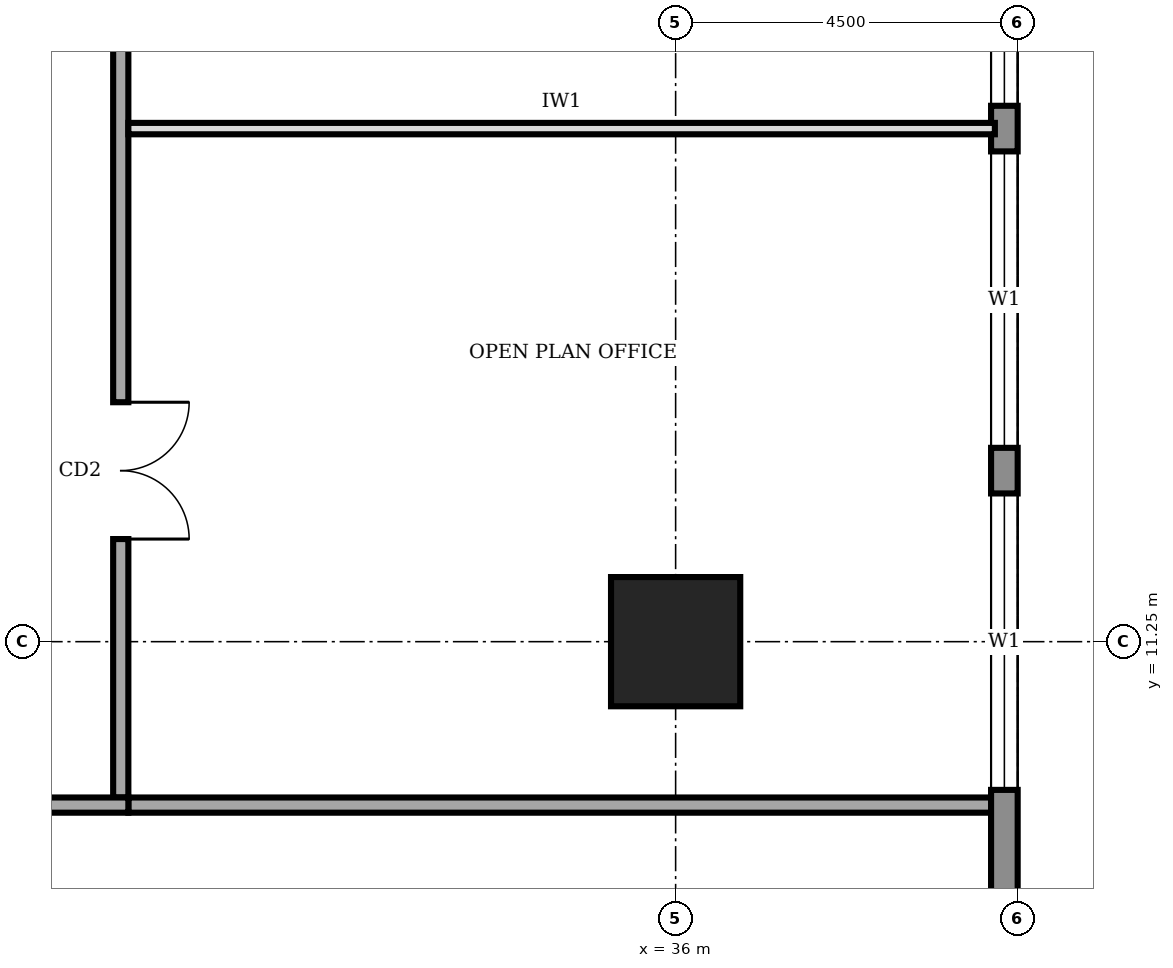
"""IFC4 building model, lengths in metres.
Left out: names, types, materials, properties, quantities, classifications, styles, units other than length and angle.
Written with IfcOpenShell. Run it as: python <this file> out.ifc"""

import sys

from ifc_helpers import new_model, si_unit, direction, frame, frame_2d, origin, origin_2d, place, context, subcontext, project, spatial, rectangle, extrude, element, fill, save


model = new_model("IFC4")
c1 = context("Model", 3, precision=1e-05, world=origin(), true_north=direction((0.0, 1.0)))
c2 = subcontext(c1, "Body", "Model", "MODEL_VIEW")
j1 = project(units=[si_unit("LENGTHUNIT", "METRE"), si_unit("PLANEANGLEUNIT", "RADIAN")], contexts=[c1])
p1 = place(None, origin())
s1 = spatial("IfcSite", under=j1, at=p1, CompositionType="ELEMENT")
p2 = place(p1, origin())
s2 = spatial("IfcBuilding", under=s1, at=p2, CompositionType="ELEMENT")
p3 = place(p2, frame((0.0, 0.0, 273.0)))
s3 = spatial("IfcBuildingStorey", under=s2, at=p3, CompositionType="ELEMENT", Elevation=273.0)
p4 = place(p3, frame((36.0, 11.25, 0.0), z_axis=(0.0, 0.0, 1.0), x_axis=(1.0, 0.0, 0.0)))
e1 = element("IfcColumn", 1, at=p4, inside=s3, PredefinedType="COLUMN", context=c2, shape_type="SweptSolid", body=[
    extrude(rectangle(XDim=1.7, YDim=1.7, at=origin_2d()), origin(), (0.0, 0.0, 1.0), 4.0),
])
p5 = place(p3, frame((40.325, 4.52, 0.0), z_axis=(0.0, 0.0, 1.0), x_axis=(0.0, 1.0, 0.0)))
e2 = element("IfcWall", 2, at=p5, inside=s3, PredefinedType="STANDARD", context=c2, shape_type="SweptSolid", body=[
    extrude(rectangle(XDim=31.46, YDim=0.35, at=frame_2d((15.73, 0.0))), origin(), (0.0, 0.0, 1.0), 3.75),
])
p6 = place(p5, frame((4.78, 0.0, 0.9)))
e3 = element("IfcOpeningElement", 3, at=p6, cuts=e2, PredefinedType="OPENING", context=c2, shape_type="SweptSolid", body=[
    extrude(rectangle(XDim=3.9, YDim=2.2, at=frame_2d((1.95, 1.1))), frame((0.0, 0.185, 0.0), z_axis=(0.0, -1.0, 0.0), x_axis=(1.0, 0.0, 0.0)), (0.0, 0.0, 1.0), 0.37),
])
p7 = place(p5, frame((9.28, 0.0, 0.9)))
e4 = element("IfcOpeningElement", 4, at=p7, cuts=e2, PredefinedType="OPENING", context=c2, shape_type="SweptSolid", body=[
    extrude(rectangle(XDim=3.9, YDim=2.2, at=frame_2d((1.95, 1.1))), frame((0.0, 0.185, 0.0), z_axis=(0.0, -1.0, 0.0), x_axis=(1.0, 0.0, 0.0)), (0.0, 0.0, 1.0), 0.37),
])
p8 = place(p5, frame((13.78, 0.0, 0.9)))
e5 = element("IfcOpeningElement", 5, at=p8, cuts=e2, PredefinedType="OPENING", context=c2, shape_type="SweptSolid", body=[
    extrude(rectangle(XDim=3.9, YDim=2.2, at=frame_2d((1.95, 1.1))), frame((0.0, 0.185, 0.0), z_axis=(0.0, -1.0, 0.0), x_axis=(1.0, 0.0, 0.0)), (0.0, 0.0, 1.0), 0.37),
])
p9 = place(p5, frame((18.28, 0.0, 0.9)))
e6 = element("IfcOpeningElement", 6, at=p9, cuts=e2, PredefinedType="OPENING", context=c2, shape_type="SweptSolid", body=[
    extrude(rectangle(XDim=3.9, YDim=2.2, at=frame_2d((1.95, 1.1))), frame((0.0, 0.185, 0.0), z_axis=(0.0, -1.0, 0.0), x_axis=(1.0, 0.0, 0.0)), (0.0, 0.0, 1.0), 0.37),
])
p10 = place(p5, frame((22.78, 0.0, 0.9)))
e7 = element("IfcOpeningElement", 7, at=p10, cuts=e2, PredefinedType="OPENING", context=c2, shape_type="SweptSolid", body=[
    extrude(rectangle(XDim=3.9, YDim=2.2, at=frame_2d((1.95, 1.1))), frame((0.0, 0.185, 0.0), z_axis=(0.0, -1.0, 0.0), x_axis=(1.0, 0.0, 0.0)), (0.0, 0.0, 1.0), 0.37),
])
p11 = place(p5, frame((27.21, 0.0, 0.9)))
e8 = element("IfcOpeningElement", 8, at=p11, cuts=e2, PredefinedType="OPENING", context=c2, shape_type="SweptSolid", body=[
    extrude(rectangle(XDim=3.9, YDim=2.2, at=frame_2d((1.95, 1.1))), frame((0.0, 0.185, 0.0), z_axis=(0.0, -1.0, 0.0), x_axis=(1.0, 0.0, 0.0)), (0.0, 0.0, 1.0), 0.37),
])
p12 = place(p3, frame((11.9, 9.1, 0.0), z_axis=(0.0, 0.0, 1.0), x_axis=(1.0, 0.0, 0.0)))
e9 = element("IfcWall", 9, at=p12, inside=s3, PredefinedType="SOLIDWALL", context=c2, shape_type="SweptSolid", body=[
    extrude(rectangle(XDim=16.9, YDim=0.2, at=frame_2d((8.45, 0.0))), origin(), (0.0, 0.0, 1.0), 3.75),
])
p13 = place(p12, frame((0.275, 0.0, 0.0)))
e10 = element("IfcOpeningElement", 10, at=p13, cuts=e9, PredefinedType="OPENING", context=c2, shape_type="SweptSolid", body=[
    extrude(rectangle(XDim=1.0, YDim=2.1, at=frame_2d((0.5, 1.05))), frame((0.0, 0.11, 0.0), z_axis=(0.0, -1.0, 0.0), x_axis=(1.0, 0.0, 0.0)), (0.0, 0.0, 1.0), 0.22),
])
p14 = place(p12, frame((8.35, 0.0, 0.0)))
e11 = element("IfcOpeningElement", 11, at=p14, cuts=e9, PredefinedType="OPENING", context=c2, shape_type="SweptSolid", body=[
    extrude(rectangle(XDim=1.8, YDim=2.1, at=frame_2d((0.9, 1.05))), frame((0.0, 0.11, 0.0), z_axis=(0.0, -1.0, 0.0), x_axis=(1.0, 0.0, 0.0)), (0.0, 0.0, 1.0), 0.22),
])
p15 = place(p3, frame((28.7, 9.2, 0.0), z_axis=(0.0, 0.0, 1.0), x_axis=(0.0, 1.0, 0.0)))
e12 = element("IfcWall", 12, at=p15, inside=s3, PredefinedType="SOLIDWALL", context=c2, shape_type="SweptSolid", body=[
    extrude(rectangle(XDim=23.8, YDim=0.2, at=frame_2d((11.9, 0.0))), origin(), (0.0, 0.0, 1.0), 3.75),
])
p16 = place(p15, frame((3.4, 0.0, 0.0)))
e13 = element("IfcOpeningElement", 13, at=p16, cuts=e12, PredefinedType="OPENING", context=c2, shape_type="SweptSolid", body=[
    extrude(rectangle(XDim=1.8, YDim=2.1, at=frame_2d((0.9, 1.05))), frame((0.0, 0.11, 0.0), z_axis=(0.0, -1.0, 0.0), x_axis=(1.0, 0.0, 0.0)), (0.0, 0.0, 1.0), 0.22),
])
p17 = place(p15, frame((10.55, 0.0, 0.0)))
e14 = element("IfcOpeningElement", 14, at=p17, cuts=e12, PredefinedType="OPENING", context=c2, shape_type="SweptSolid", body=[
    extrude(rectangle(XDim=1.0, YDim=2.1, at=frame_2d((0.5, 1.05))), frame((0.0, 0.11, 0.0), z_axis=(0.0, -1.0, 0.0), x_axis=(1.0, 0.0, 0.0)), (0.0, 0.0, 1.0), 0.22),
])
p18 = place(p15, frame((17.65, 0.0, 0.0)))
e15 = element("IfcOpeningElement", 15, at=p18, cuts=e12, PredefinedType="OPENING", context=c2, shape_type="SweptSolid", body=[
    extrude(rectangle(XDim=1.8, YDim=2.1, at=frame_2d((0.9, 1.05))), frame((0.0, 0.11, 0.0), z_axis=(0.0, -1.0, 0.0), x_axis=(1.0, 0.0, 0.0)), (0.0, 0.0, 1.0), 0.22),
])
p19 = place(p3, frame((28.8, 9.1, 0.0), z_axis=(0.0, 0.0, 1.0), x_axis=(1.0, 0.0, 0.0)))
e16 = element("IfcWall", 16, at=p19, inside=s3, PredefinedType="SOLIDWALL", context=c2, shape_type="SweptSolid", body=[
    extrude(rectangle(XDim=11.4, YDim=0.2, at=frame_2d((5.7, 0.0))), origin(), (0.0, 0.0, 1.0), 3.75),
])
p20 = place(p3, frame((28.8, 18.0, 0.0), z_axis=(0.0, 0.0, 1.0), x_axis=(1.0, 0.0, 0.0)))
e17 = element("IfcWall", 17, at=p20, inside=s3, PredefinedType="PARTITIONING", context=c2, shape_type="SweptSolid", body=[
    extrude(rectangle(XDim=11.4, YDim=0.15, at=frame_2d((5.7, 0.0))), origin(), (0.0, 0.0, 1.0), 3.75),
])
p21 = place(p6, origin())
e18 = element("IfcWindow", 18, at=p21, inside=s3, PartitioningType="SINGLE_PANEL", PredefinedType="WINDOW", context=c2, shape_type="SweptSolid", body=[
    extrude(rectangle(XDim=3.9, YDim=2.2, at=frame_2d((1.95, 1.1))), frame((0.0, 0.03, 0.0), z_axis=(0.0, -1.0, 0.0), x_axis=(1.0, 0.0, 0.0)), (0.0, 0.0, 1.0), 0.06),
])
fill(e3, e18)
p22 = place(p7, origin())
e19 = element("IfcWindow", 19, at=p22, inside=s3, PartitioningType="SINGLE_PANEL", PredefinedType="WINDOW", context=c2, shape_type="SweptSolid", body=[
    extrude(rectangle(XDim=3.9, YDim=2.2, at=frame_2d((1.95, 1.1))), frame((0.0, 0.03, 0.0), z_axis=(0.0, -1.0, 0.0), x_axis=(1.0, 0.0, 0.0)), (0.0, 0.0, 1.0), 0.06),
])
fill(e4, e19)
p23 = place(p8, origin())
e20 = element("IfcWindow", 20, at=p23, inside=s3, PartitioningType="SINGLE_PANEL", PredefinedType="WINDOW", context=c2, shape_type="SweptSolid", body=[
    extrude(rectangle(XDim=3.9, YDim=2.2, at=frame_2d((1.95, 1.1))), frame((0.0, 0.03, 0.0), z_axis=(0.0, -1.0, 0.0), x_axis=(1.0, 0.0, 0.0)), (0.0, 0.0, 1.0), 0.06),
])
fill(e5, e20)
p24 = place(p16, frame((1.8, 0.0, 0.0), z_axis=(0.0, 0.0, 1.0), x_axis=(-1.0, 0.0, 0.0)))
e21 = element("IfcDoor", 21, at=p24, inside=s3, OperationType="DOUBLE_DOOR_SINGLE_SWING", PredefinedType="DOOR", context=c2, shape_type="SweptSolid", body=[
    extrude(rectangle(XDim=1.8, YDim=2.1, at=frame_2d((0.9, 1.05))), frame((0.0, 0.025, 0.0), z_axis=(0.0, -1.0, 0.0), x_axis=(1.0, 0.0, 0.0)), (0.0, 0.0, 1.0), 0.05),
])
fill(e13, e21)
save(model, sys.argv[1])
